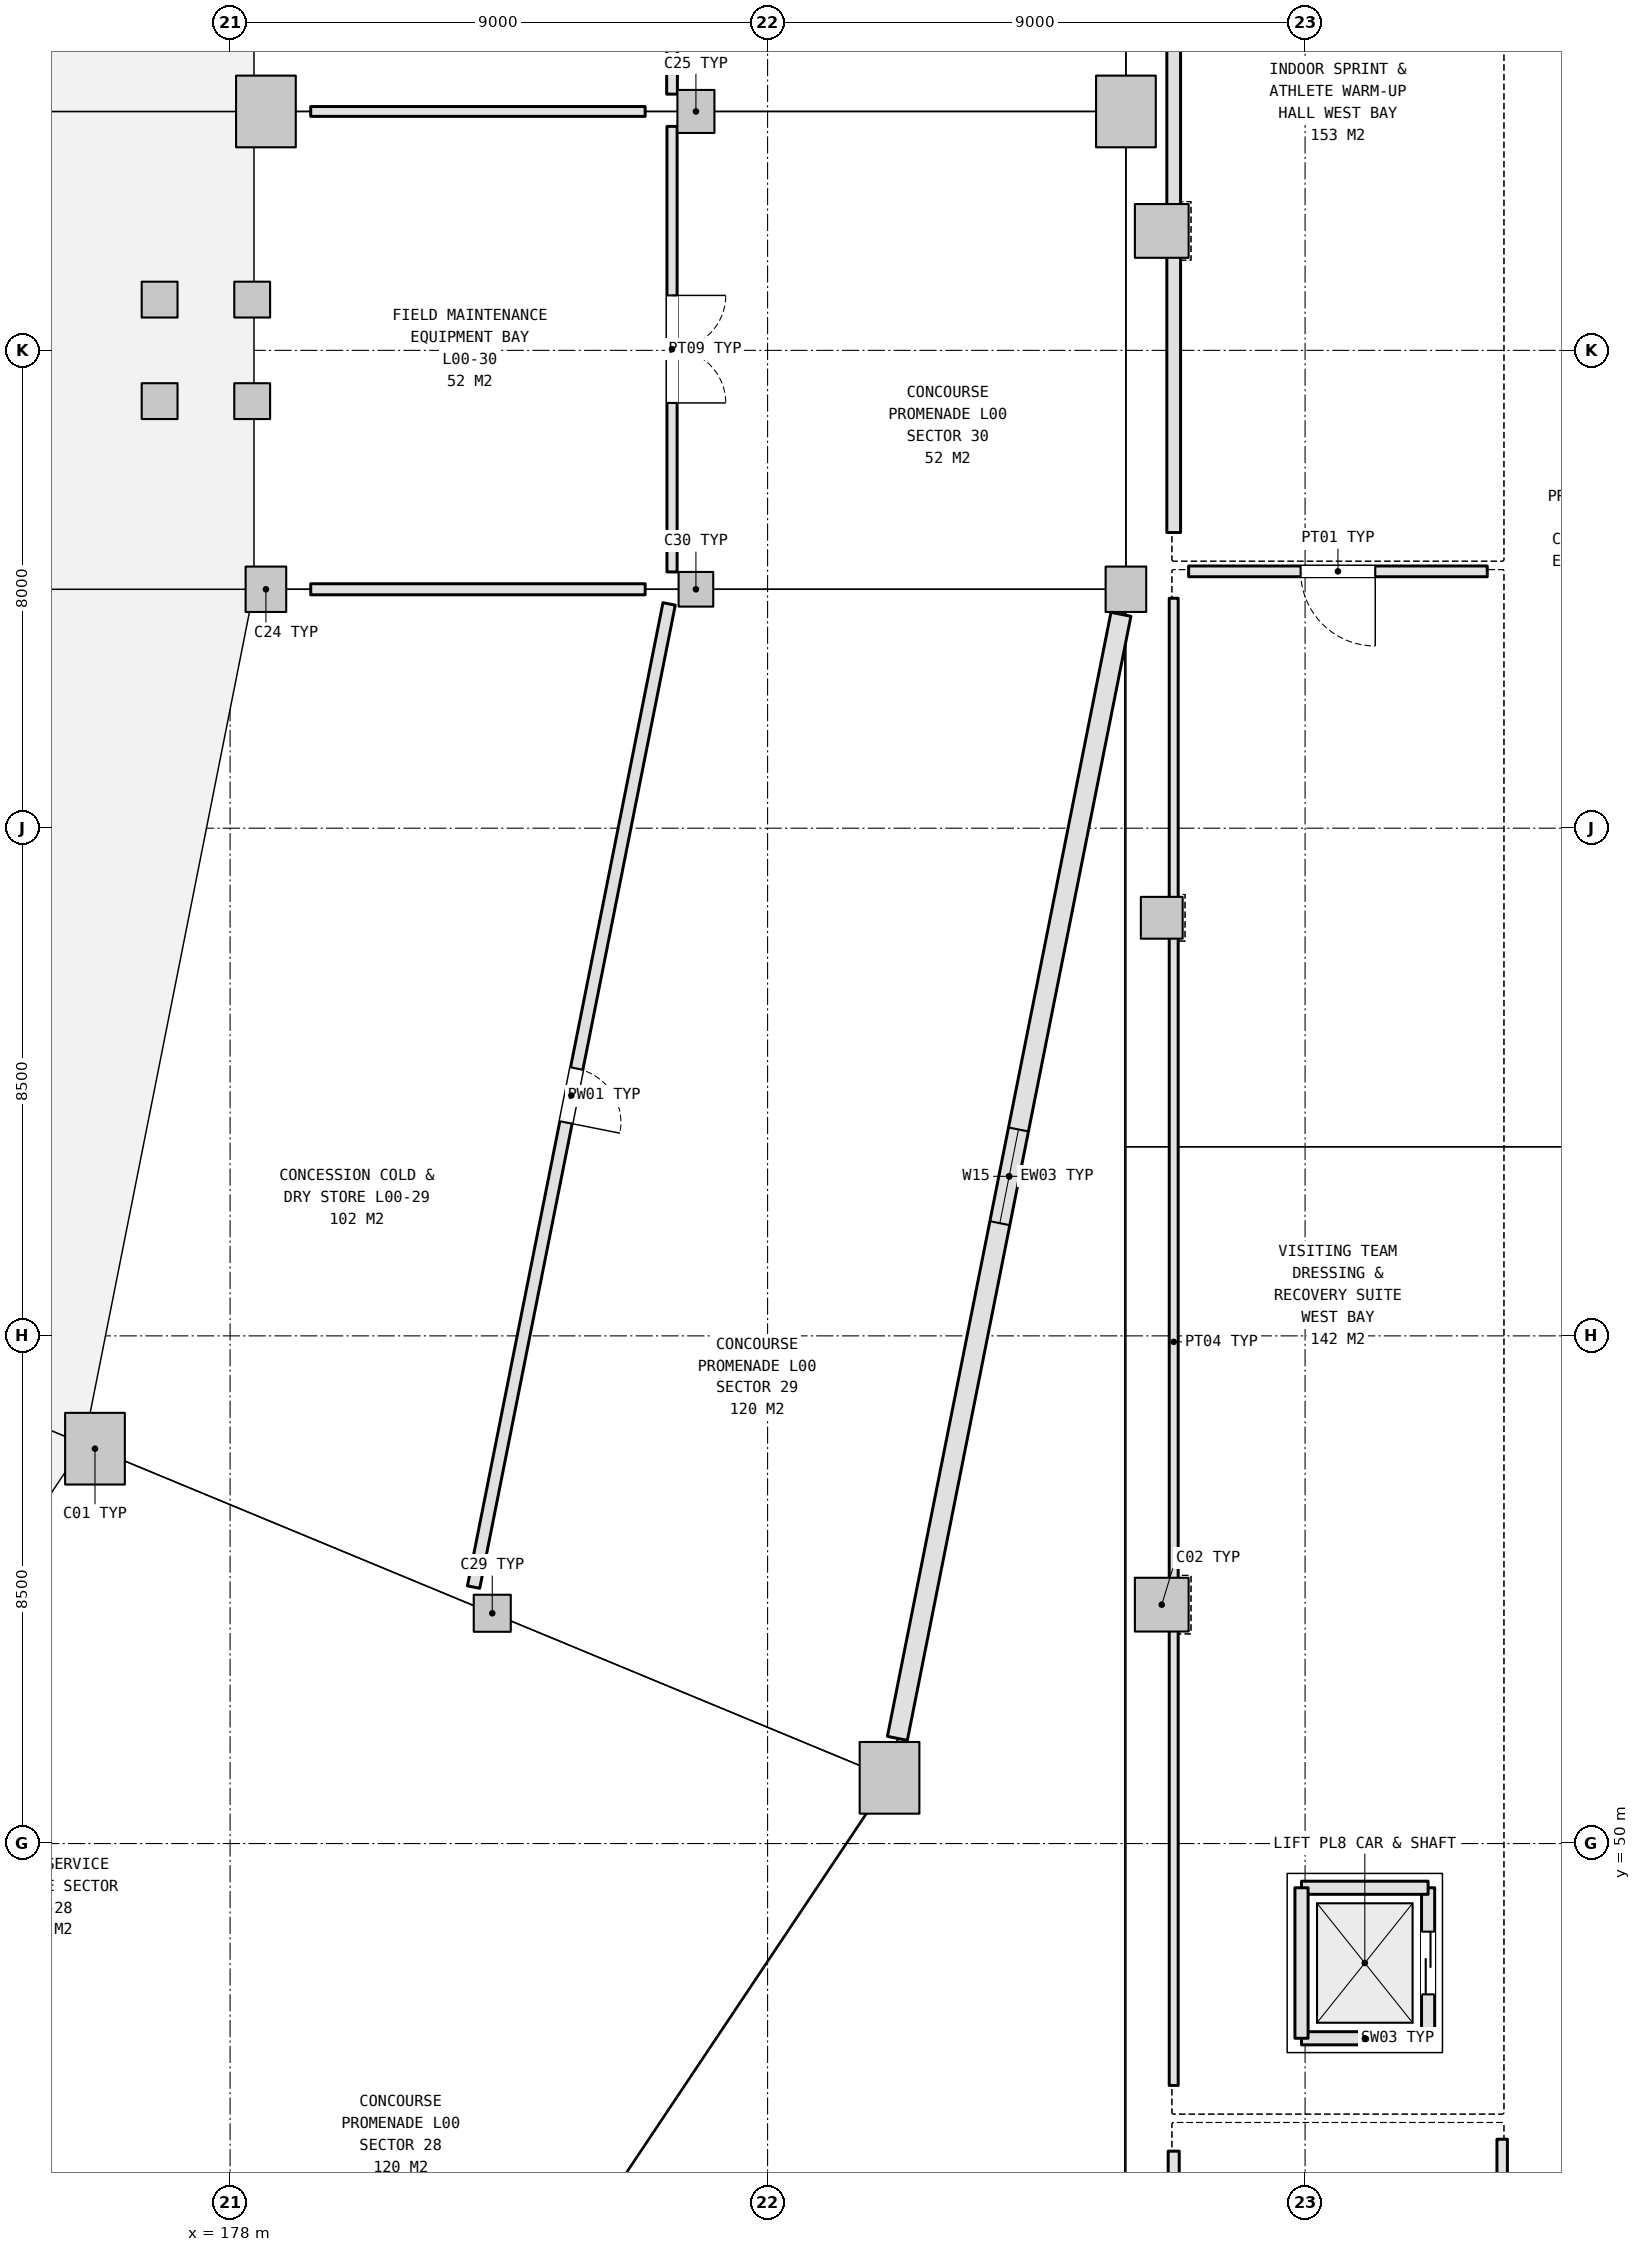
"""IFC4 building model, lengths in metres.
Left out: names, types, materials, properties, quantities, classifications, styles, units other than length and angle.
Written with IfcOpenShell. Run it as: python <this file> out.ifc"""

import sys

from ifc_helpers import new_model, si_unit, direction, frame, frame_2d, origin, origin_2d, place, context, subcontext, project, spatial, rectangle, extrude, element, fill, save


model = new_model("IFC4")
c1 = context("Model", 3, precision=1e-05, world=origin(), true_north=direction((0.0, 1.0)))
c2 = subcontext(c1, "Body", "Model", "MODEL_VIEW")
j1 = project(units=[si_unit("LENGTHUNIT", "METRE"), si_unit("PLANEANGLEUNIT", "RADIAN")], contexts=[c1])
p1 = place(None, origin())
s1 = spatial("IfcSite", under=j1, at=p1, CompositionType="ELEMENT")
p2 = place(p1, origin())
s2 = spatial("IfcBuilding", under=s1, at=p2, CompositionType="ELEMENT")
p3 = place(p2, origin())
s3 = spatial("IfcBuildingStorey", under=s2, at=p3, CompositionType="ELEMENT", Elevation=0.0)
p4 = place(p3, frame((175.738, 56.611, 0.0), z_axis=(0.0, 0.0, 1.0), x_axis=(1.0, 0.0, 0.0)))
e1 = element("IfcColumn", 1, at=p4, inside=s3, PredefinedType="COLUMN", context=c2, shape_type="SweptSolid", body=[
    extrude(rectangle(XDim=1.0, YDim=1.2, at=origin_2d()), origin(), (0.0, 0.0, 1.0), 5.4),
])
p5 = place(p3, frame((182.39, 53.856, 0.0), z_axis=(0.0, 0.0, 1.0), x_axis=(1.0, 0.0, 0.0)))
e2 = element("IfcColumn", 2, at=p5, inside=s3, PredefinedType="COLUMN", context=c2, shape_type="SweptSolid", body=[
    extrude(rectangle(XDim=0.62, YDim=0.62, at=origin_2d()), origin(), (0.0, 0.0, 1.0), 5.4),
])
p6 = place(p3, frame((189.042, 51.1, 0.0), z_axis=(0.0, 0.0, 1.0), x_axis=(1.0, 0.0, 0.0)))
e3 = element("IfcColumn", 3, at=p6, inside=s3, PredefinedType="COLUMN", context=c2, shape_type="SweptSolid", body=[
    extrude(rectangle(XDim=1.0, YDim=1.2, at=origin_2d()), origin(), (0.0, 0.0, 1.0), 5.4),
])
p7 = place(p3, frame((178.6, 71.0, 0.0), z_axis=(0.0, 0.0, 1.0), x_axis=(1.0, 0.0, 0.0)))
e4 = element("IfcColumn", 4, at=p7, inside=s3, PredefinedType="COLUMN", context=c2, shape_type="SweptSolid", body=[
    extrude(rectangle(XDim=0.68, YDim=0.76, at=origin_2d()), origin(), (0.0, 0.0, 1.0), 5.4),
])
p8 = place(p3, frame((185.8, 71.0, 0.0), z_axis=(0.0, 0.0, 1.0), x_axis=(1.0, 0.0, 0.0)))
e5 = element("IfcColumn", 5, at=p8, inside=s3, PredefinedType="COLUMN", context=c2, shape_type="SweptSolid", body=[
    extrude(rectangle(XDim=0.58, YDim=0.58, at=origin_2d()), origin(), (0.0, 0.0, 1.0), 5.4),
])
p9 = place(p3, frame((193.0, 71.0, 0.0), z_axis=(0.0, 0.0, 1.0), x_axis=(1.0, 0.0, 0.0)))
e6 = element("IfcColumn", 6, at=p9, inside=s3, PredefinedType="COLUMN", context=c2, shape_type="SweptSolid", body=[
    extrude(rectangle(XDim=0.68, YDim=0.76, at=origin_2d()), origin(), (0.0, 0.0, 1.0), 5.4),
])
p10 = place(p3, frame((178.6, 79.0, 0.0), z_axis=(0.0, 0.0, 1.0), x_axis=(1.0, 0.0, 0.0)))
e7 = element("IfcColumn", 7, at=p10, inside=s3, PredefinedType="COLUMN", context=c2, shape_type="SweptSolid", body=[
    extrude(rectangle(XDim=1.0, YDim=1.2, at=origin_2d()), origin(), (0.0, 0.0, 1.0), 5.4),
])
p11 = place(p3, frame((185.8, 79.0, 0.0), z_axis=(0.0, 0.0, 1.0), x_axis=(1.0, 0.0, 0.0)))
e8 = element("IfcColumn", 8, at=p11, inside=s3, PredefinedType="COLUMN", context=c2, shape_type="SweptSolid", body=[
    extrude(rectangle(XDim=0.62, YDim=0.72, at=origin_2d()), origin(), (0.0, 0.0, 1.0), 5.4),
])
p12 = place(p3, frame((193.0, 79.0, 0.0), z_axis=(0.0, 0.0, 1.0), x_axis=(1.0, 0.0, 0.0)))
e9 = element("IfcColumn", 9, at=p12, inside=s3, PredefinedType="COLUMN", context=c2, shape_type="SweptSolid", body=[
    extrude(rectangle(XDim=1.0, YDim=1.2, at=origin_2d()), origin(), (0.0, 0.0, 1.0), 5.4),
])
p13 = place(p3, frame((193.6, 54.0, 0.0), z_axis=(0.0, 0.0, 1.0), x_axis=(1.0, 0.0, 0.0)))
e10 = element("IfcColumn", 10, at=p13, inside=s3, PredefinedType="COLUMN", context=c2, shape_type="SweptSolid", body=[
    extrude(rectangle(XDim=0.9, YDim=0.9, at=origin_2d()), origin(), (0.0, 0.0, 1.0), 5.4),
])
p14 = place(p3, frame((193.6, 65.5, 0.0), z_axis=(0.0, 0.0, 1.0), x_axis=(1.0, 0.0, 0.0)))
e11 = element("IfcColumn", 11, at=p14, inside=s3, PredefinedType="COLUMN", context=c2, shape_type="SweptSolid", body=[
    extrude(rectangle(XDim=0.7, YDim=0.7, at=origin_2d()), origin(), (0.0, 0.0, 1.0), 5.4),
])
p15 = place(p3, frame((193.6, 77.0, 0.0), z_axis=(0.0, 0.0, 1.0), x_axis=(1.0, 0.0, 0.0)))
e12 = element("IfcColumn", 12, at=p15, inside=s3, PredefinedType="COLUMN", context=c2, shape_type="SweptSolid", body=[
    extrude(rectangle(XDim=0.9, YDim=0.9, at=origin_2d()), origin(), (0.0, 0.0, 1.0), 5.4),
])
p16 = place(p3, frame((189.173, 51.761, 0.0), z_axis=(0.0, 0.0, 1.0), x_axis=(0.19509817024, 0.980783719262, 0.0)))
e13 = element("IfcWall", 13, at=p16, inside=s3, PredefinedType="SOLIDWALL", context=c2, shape_type="SweptSolid", body=[
    extrude(rectangle(XDim=19.188, YDim=0.34, at=frame_2d((9.594, 0.0))), origin(), (0.0, 0.0, 1.0), 4.275),
])
p17 = place(p16, frame((8.794, 0.0, 2.4)))
e14 = element("IfcOpeningElement", 14, at=p17, cuts=e13, PredefinedType="OPENING", context=c2, shape_type="SweptSolid", body=[
    extrude(rectangle(XDim=1.6, YDim=1.2, at=frame_2d((0.8, 0.6))), frame((0.0, 0.18, 0.0), z_axis=(0.0, -1.0, 0.0), x_axis=(1.0, 0.0, 0.0)), (0.0, 0.0, 1.0), 0.36),
])
for number, where, z_axis, x_axis in (
    (15, (178.37, 75.85, 0.0), (0.0, 0.0, 1.0), (1.0, 0.0, 0.0)),
    (16, (176.82, 75.85, 0.0), (0.0, 0.0, 1.0), (1.0, 0.0, 0.0)),
    (17, (176.82, 74.15, 0.0), (0.0, 0.0, 1.0), (1.0, 0.0, 0.0)),
    (18, (178.37, 74.15, 0.0), (0.0, 0.0, 1.0), (1.0, 0.0, 0.0)),
):
    element("IfcColumn", number, at=place(p3, frame(where, z_axis=z_axis, x_axis=x_axis)), inside=s3, PredefinedType="COLUMN", context=c2, shape_type="SweptSolid", body=[
        extrude(rectangle(XDim=0.6, YDim=0.6, at=origin_2d()), origin(), (0.0, 0.0, 1.0), 5.4),
    ])
p18 = place(p3, frame((195.94, 46.74, -1.1), z_axis=(0.0, 0.0, 1.0), x_axis=(1.0, 0.0, 0.0)))
e19 = element("IfcWall", 19, at=p18, inside=s3, PredefinedType="SHEAR", context=c2, shape_type="SweptSolid", body=[
    extrude(rectangle(XDim=2.12, YDim=0.22, at=frame_2d((1.06, 0.0))), origin(), (0.0, 0.0, 1.0), 6.24),
])
p19 = place(p3, frame((198.06, 46.74, -1.1), z_axis=(0.0, 0.0, 1.0), x_axis=(0.0, 1.0, 0.0)))
e20 = element("IfcWall", 20, at=p19, inside=s3, PredefinedType="SHEAR", context=c2, shape_type="SweptSolid", body=[
    extrude(rectangle(XDim=2.52, YDim=0.22, at=frame_2d((1.26, 0.0))), origin(), (0.0, 0.0, 1.0), 6.24),
])
p20 = place(p19, frame((0.735, 0.0, 1.1)))
e21 = element("IfcOpeningElement", 21, at=p20, cuts=e20, PredefinedType="OPENING", context=c2, shape_type="SweptSolid", body=[
    extrude(rectangle(XDim=1.05, YDim=2.15, at=frame_2d((0.525, 1.075))), frame((0.0, 0.12, 0.0), z_axis=(0.0, -1.0, 0.0), x_axis=(1.0, 0.0, 0.0)), (0.0, 0.0, 1.0), 0.24),
])
p21 = place(p3, frame((198.06, 49.26, -1.1), z_axis=(0.0, 0.0, 1.0), x_axis=(-1.0, 0.0, 0.0)))
e22 = element("IfcWall", 22, at=p21, inside=s3, PredefinedType="SHEAR", context=c2, shape_type="SweptSolid", body=[
    extrude(rectangle(XDim=2.12, YDim=0.22, at=frame_2d((1.06, 0.0))), origin(), (0.0, 0.0, 1.0), 6.24),
])
p22 = place(p3, frame((195.94, 49.26, -1.1), z_axis=(0.0, 0.0, 1.0), x_axis=(0.0, -1.0, 0.0)))
e23 = element("IfcWall", 23, at=p22, inside=s3, PredefinedType="SHEAR", context=c2, shape_type="SweptSolid", body=[
    extrude(rectangle(XDim=2.52, YDim=0.22, at=frame_2d((1.26, 0.0))), origin(), (0.0, 0.0, 1.0), 6.24),
])
p23 = place(p3, frame((199.3, 45.05, 0.0), z_axis=(0.0, 0.0, 1.0), x_axis=(0.0, -1.0, 0.0)))
e24 = element("IfcWall", 24, at=p23, inside=s3, PredefinedType="PARTITIONING", context=c2, shape_type="SweptSolid", body=[
    extrude(rectangle(XDim=25.3, YDim=0.175, at=frame_2d((12.65, 0.0))), origin(), (0.0, 0.0, 1.0), 4.625),
])
p24 = place(p23, frame((12.2, 0.0, 0.0)))
e25 = element("IfcOpeningElement", 25, at=p24, cuts=e24, PredefinedType="OPENING", context=c2, shape_type="SweptSolid", body=[
    extrude(rectangle(XDim=0.9, YDim=2.1, at=frame_2d((0.45, 1.05))), frame((0.0, 0.097, 0.0), z_axis=(0.0, -1.0, 0.0), x_axis=(1.0, 0.0, 0.0)), (0.0, 0.0, 1.0), 0.195),
])
p25 = place(p3, frame((193.8, 19.95, 0.0), z_axis=(0.0, 0.0, 1.0), x_axis=(0.0, 1.0, 0.0)))
e26 = element("IfcWall", 26, at=p25, inside=s3, PredefinedType="PARTITIONING", context=c2, shape_type="SweptSolid", body=[
    extrude(rectangle(XDim=24.9, YDim=0.185, at=frame_2d((12.45, 0.0))), origin(), (0.0, 0.0, 1.0), 4.475),
])
p26 = place(p3, frame((194.05, 71.3, 0.0), z_axis=(0.0, 0.0, 1.0), x_axis=(1.0, 0.0, 0.0)))
e27 = element("IfcWall", 27, at=p26, inside=s3, PredefinedType="PARTITIONING", context=c2, shape_type="SweptSolid", body=[
    extrude(rectangle(XDim=5.0, YDim=0.18, at=frame_2d((2.5, 0.0))), origin(), (0.0, 0.0, 1.0), 4.625),
])
p27 = place(p26, frame((1.875, 0.0, 0.0)))
e28 = element("IfcOpeningElement", 28, at=p27, cuts=e27, PredefinedType="OPENING", context=c2, shape_type="SweptSolid", body=[
    extrude(rectangle(XDim=1.25, YDim=2.2, at=frame_2d((0.625, 1.1))), frame((0.0, 0.1, 0.0), z_axis=(0.0, -1.0, 0.0), x_axis=(1.0, 0.0, 0.0)), (0.0, 0.0, 1.0), 0.2),
])
p28 = place(p3, frame((193.8, 45.95, 0.0), z_axis=(0.0, 0.0, 1.0), x_axis=(0.0, 1.0, 0.0)))
e29 = element("IfcWall", 29, at=p28, inside=s3, PredefinedType="PARTITIONING", context=c2, shape_type="SweptSolid", body=[
    extrude(rectangle(XDim=24.9, YDim=0.15, at=frame_2d((12.45, 0.0))), origin(), (0.0, 0.0, 1.0), 4.475),
])
p29 = place(p3, frame((193.8, 71.95, 0.0), z_axis=(0.0, 0.0, 1.0), x_axis=(0.0, 1.0, 0.0)))
e30 = element("IfcWall", 30, at=p29, inside=s3, PredefinedType="PLUMBINGWALL", context=c2, shape_type="SweptSolid", body=[
    extrude(rectangle(XDim=26.9, YDim=0.23, at=frame_2d((13.45, 0.0))), origin(), (0.0, 0.0, 1.0), 4.475),
])
p30 = place(p3, frame((185.351, 70.755, 0.0), z_axis=(0.0, 0.0, 1.0), x_axis=(-0.195100557291, -0.980783244425, 0.0)))
e31 = element("IfcWall", 31, at=p30, inside=s3, PredefinedType="PLUMBINGWALL", context=c2, shape_type="SweptSolid", body=[
    extrude(rectangle(XDim=16.783, YDim=0.21, at=frame_2d((8.392, 0.0))), origin(), (0.0, 0.0, 1.0), 4.365),
])
p31 = place(p30, frame((7.932, 0.0, 0.0)))
e32 = element("IfcOpeningElement", 32, at=p31, cuts=e31, PredefinedType="OPENING", context=c2, shape_type="SweptSolid", body=[
    extrude(rectangle(XDim=0.92, YDim=2.1, at=frame_2d((0.46, 1.05))), frame((0.0, 0.115, 0.0), z_axis=(0.0, -1.0, 0.0), x_axis=(1.0, 0.0, 0.0)), (0.0, 0.0, 1.0), 0.23),
])
p32 = place(p3, frame((179.35, 71.0, 0.0), z_axis=(0.0, 0.0, 1.0), x_axis=(1.0, 0.0, 0.0)))
e33 = element("IfcWall", 33, at=p32, inside=s3, PredefinedType="PARTITIONING", context=c2, shape_type="SweptSolid", body=[
    extrude(rectangle(XDim=5.6, YDim=0.185, at=frame_2d((2.8, 0.0))), origin(), (0.0, 0.0, 1.0), 4.385),
])
p33 = place(p3, frame((185.4, 78.75, 0.0), z_axis=(0.0, 0.0, 1.0), x_axis=(0.0, -1.0, 0.0)))
e34 = element("IfcWall", 34, at=p33, inside=s3, PredefinedType="PARTITIONING", context=c2, shape_type="SweptSolid", body=[
    extrude(rectangle(XDim=7.46, YDim=0.17, at=frame_2d((3.73, 0.0))), origin(), (0.0, 0.0, 1.0), 4.305),
])
p34 = place(p33, frame((2.83, 0.0, 0.0)))
e35 = element("IfcOpeningElement", 35, at=p34, cuts=e34, PredefinedType="OPENING", context=c2, shape_type="SweptSolid", body=[
    extrude(rectangle(XDim=1.8, YDim=2.2, at=frame_2d((0.9, 1.1))), frame((0.0, 0.095, 0.0), z_axis=(0.0, -1.0, 0.0), x_axis=(1.0, 0.0, 0.0)), (0.0, 0.0, 1.0), 0.19),
])
p35 = place(p3, frame((179.35, 79.0, 0.0), z_axis=(0.0, 0.0, 1.0), x_axis=(1.0, 0.0, 0.0)))
e36 = element("IfcWall", 36, at=p35, inside=s3, PredefinedType="PARTITIONING", context=c2, shape_type="SweptSolid", body=[
    extrude(rectangle(XDim=5.6, YDim=0.165, at=frame_2d((2.8, 0.0))), origin(), (0.0, 0.0, 1.0), 4.305),
])
p36 = place(p3, frame((185.4, 86.75, 0.0), z_axis=(0.0, 0.0, 1.0), x_axis=(0.0, -1.0, 0.0)))
e37 = element("IfcWall", 37, at=p36, inside=s3, PredefinedType="PARTITIONING", context=c2, shape_type="SweptSolid", body=[
    extrude(rectangle(XDim=7.46, YDim=0.18, at=frame_2d((3.73, 0.0))), origin(), (0.0, 0.0, 1.0), 4.305),
])
p37 = place(p36, frame((3.255, 0.0, 0.0)))
e38 = element("IfcOpeningElement", 38, at=p37, cuts=e37, PredefinedType="OPENING", context=c2, shape_type="SweptSolid", body=[
    extrude(rectangle(XDim=0.95, YDim=2.15, at=frame_2d((0.475, 1.075))), frame((0.0, 0.1, 0.0), z_axis=(0.0, -1.0, 0.0), x_axis=(1.0, 0.0, 0.0)), (0.0, 0.0, 1.0), 0.2),
])
p38 = place(p17, origin())
e39 = element("IfcWindow", 39, at=p38, inside=s3, PartitioningType="SINGLE_PANEL", PredefinedType="WINDOW", context=c2, shape_type="SweptSolid", body=[
    extrude(rectangle(XDim=1.6, YDim=1.2, at=frame_2d((0.8, 0.6))), frame((0.0, 0.03, 0.0), z_axis=(0.0, -1.0, 0.0), x_axis=(1.0, 0.0, 0.0)), (0.0, 0.0, 1.0), 0.06),
])
fill(e14, e39)
p39 = place(p20, origin())
e40 = element("IfcDoor", 40, at=p39, inside=s3, OperationType="DOUBLE_DOOR_SLIDING", PredefinedType="DOOR", context=c2, shape_type="SweptSolid", body=[
    extrude(rectangle(XDim=1.05, YDim=2.15, at=frame_2d((0.525, 1.075))), frame((0.0, 0.025, 0.0), z_axis=(0.0, -1.0, 0.0), x_axis=(1.0, 0.0, 0.0)), (0.0, 0.0, 1.0), 0.05),
])
fill(e21, e40)
p40 = place(p27, frame((1.25, 0.0, 0.0), z_axis=(0.0, 0.0, 1.0), x_axis=(-1.0, 0.0, 0.0)))
e41 = element("IfcDoor", 41, at=p40, inside=s3, OperationType="SINGLE_SWING_RIGHT", PredefinedType="DOOR", context=c2, shape_type="SweptSolid", body=[
    extrude(rectangle(XDim=1.25, YDim=2.2, at=frame_2d((0.625, 1.1))), frame((0.0, 0.025, 0.0), z_axis=(0.0, -1.0, 0.0), x_axis=(1.0, 0.0, 0.0)), (0.0, 0.0, 1.0), 0.05),
])
fill(e28, e41)
p41 = place(p31, origin())
e42 = element("IfcDoor", 42, at=p41, inside=s3, OperationType="SINGLE_SWING_RIGHT", PredefinedType="DOOR", context=c2, shape_type="SweptSolid", body=[
    extrude(rectangle(XDim=0.92, YDim=2.1, at=frame_2d((0.46, 1.05))), frame((0.0, 0.025, 0.0), z_axis=(0.0, -1.0, 0.0), x_axis=(1.0, 0.0, 0.0)), (0.0, 0.0, 1.0), 0.05),
])
fill(e32, e42)
p42 = place(p34, origin())
e43 = element("IfcDoor", 43, at=p42, inside=s3, OperationType="DOUBLE_DOOR_SINGLE_SWING", PredefinedType="DOOR", context=c2, shape_type="SweptSolid", body=[
    extrude(rectangle(XDim=1.8, YDim=2.2, at=frame_2d((0.9, 1.1))), frame((0.0, 0.025, 0.0), z_axis=(0.0, -1.0, 0.0), x_axis=(1.0, 0.0, 0.0)), (0.0, 0.0, 1.0), 0.05),
])
fill(e35, e43)
save(model, sys.argv[1])
